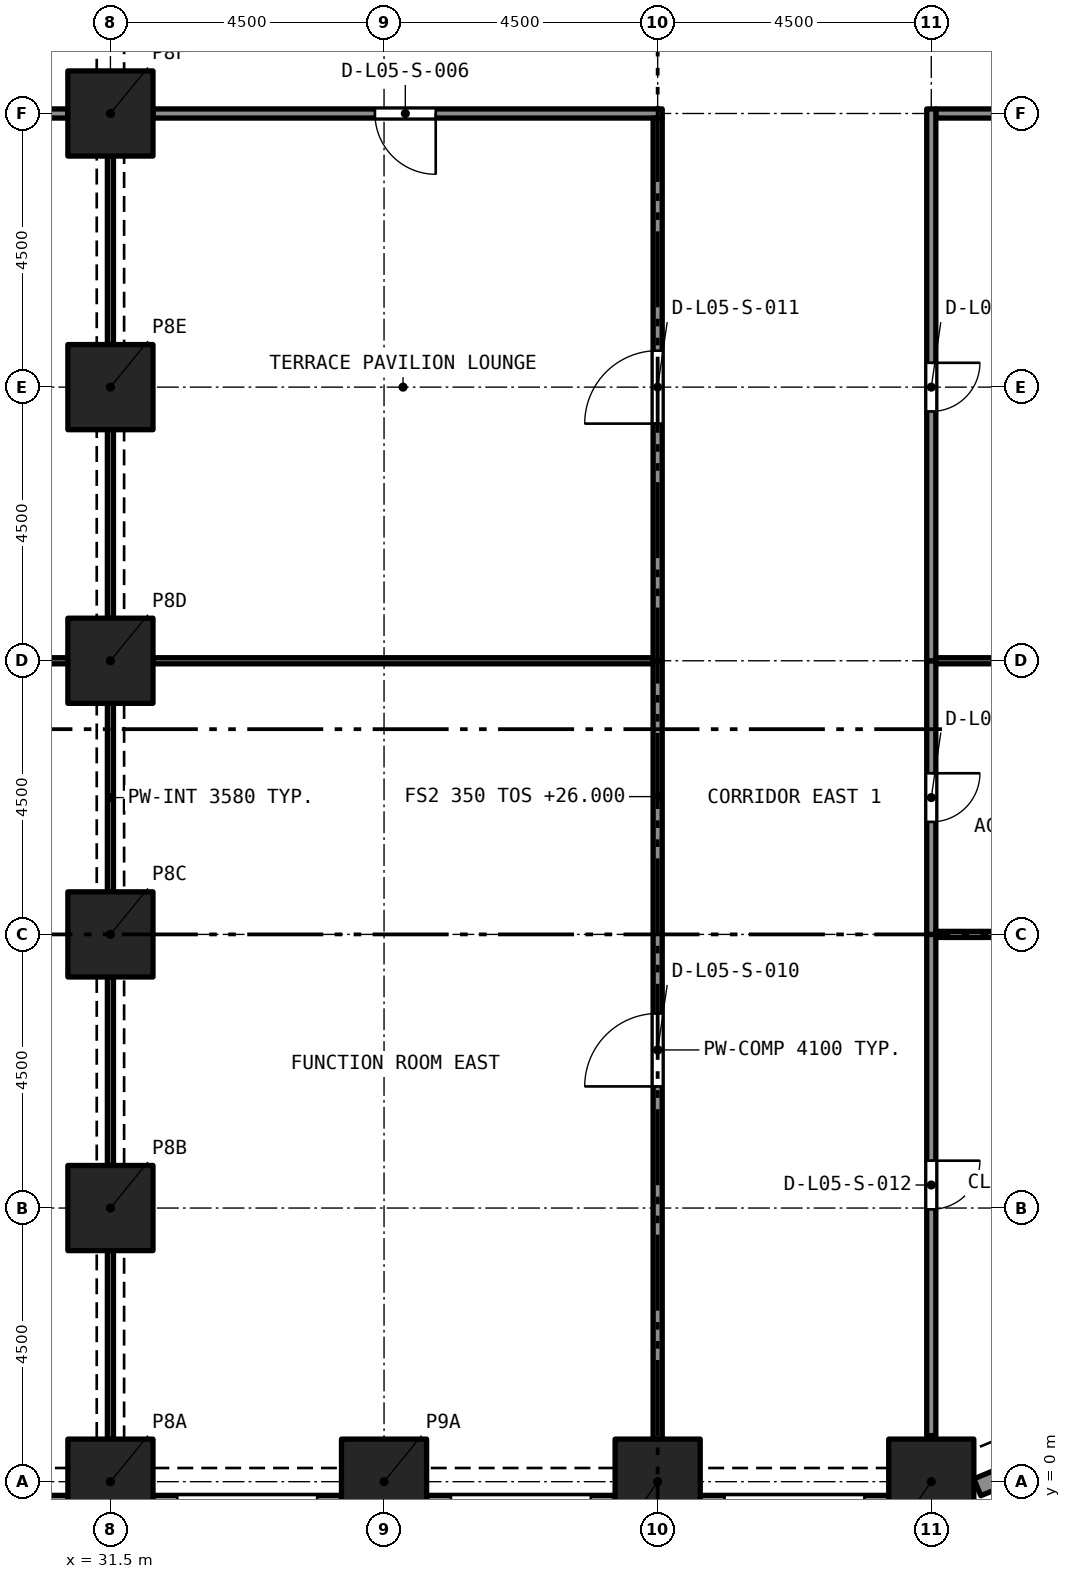
"""IFC4 building model, lengths in metres.
Left out: names, types, materials, properties, quantities, classifications, styles, units other than length and angle.
Written with IfcOpenShell. Run it as: python <this file> out.ifc"""

import sys

from ifc_helpers import new_model, si_unit, direction, frame, frame_2d, origin, origin_2d, place, context, subcontext, project, spatial, rectangle, extrude, element, fill, save


model = new_model("IFC4")
c1 = context("Model", 3, precision=1e-05, world=origin(), true_north=direction((0.0, 1.0)))
c2 = subcontext(c1, "Body", "Model", "MODEL_VIEW")
j1 = project(units=[si_unit("LENGTHUNIT", "METRE"), si_unit("PLANEANGLEUNIT", "RADIAN")], contexts=[c1])
p1 = place(None, origin())
s1 = spatial("IfcSite", under=j1, at=p1, CompositionType="ELEMENT")
p2 = place(p1, origin())
s2 = spatial("IfcBuilding", under=s1, at=p2, CompositionType="ELEMENT")
p3 = place(p2, frame((0.0, 0.0, 26.0)))
s3 = spatial("IfcBuildingStorey", under=s2, at=p3, CompositionType="ELEMENT", Elevation=26.0)
for number, where, z_axis, x_axis in (
    (1, (31.5, 0.0, 0.0), (0.0, 0.0, 1.0), (1.0, 0.0, 0.0)),
    (2, (36.0, 0.0, 0.0), (0.0, 0.0, 1.0), (1.0, 0.0, 0.0)),
    (3, (40.5, 0.0, 0.0), (0.0, 0.0, 1.0), (1.0, 0.0, 0.0)),
    (4, (45.0, 0.0, 0.0), (0.0, 0.0, 1.0), (1.0, 0.0, 0.0)),
    (5, (31.5, 4.5, 0.0), (0.0, 0.0, 1.0), (1.0, 0.0, 0.0)),
    (6, (31.5, 9.0, 0.0), (0.0, 0.0, 1.0), (1.0, 0.0, 0.0)),
    (7, (31.5, 13.5, 0.0), (0.0, 0.0, 1.0), (1.0, 0.0, 0.0)),
    (8, (31.5, 18.0, 0.0), (0.0, 0.0, 1.0), (1.0, 0.0, 0.0)),
    (9, (31.5, 22.5, 0.0), (0.0, 0.0, 1.0), (1.0, 0.0, 0.0)),
):
    element("IfcColumn", number, at=place(p3, frame(where, z_axis=z_axis, x_axis=x_axis)), inside=s3, PredefinedType="COLUMN", context=c2, shape_type="SweptSolid", body=[
        extrude(rectangle(XDim=1.4, YDim=1.4, at=origin_2d()), origin(), (0.0, 0.0, 1.0), 4.4),
    ])
p4 = place(p3, frame((30.8, -0.375, 0.0), z_axis=(0.0, 0.0, 1.0), x_axis=(-1.0, 0.0, 0.0)))
e10 = element("IfcWall", 10, at=p4, inside=s3, PredefinedType="SOLIDWALL", context=c2, shape_type="SweptSolid", body=[
    extrude(rectangle(XDim=3.1, YDim=0.3, at=frame_2d((1.55, 0.0))), origin(), (0.0, 0.0, 1.0), 4.4),
])
p5 = place(p4, frame((0.4, 0.0, 0.45)))
e11 = element("IfcOpeningElement", 11, at=p5, cuts=e10, PredefinedType="OPENING", context=c2, shape_type="SweptSolid", body=[
    extrude(rectangle(XDim=2.3, YDim=2.55, at=frame_2d((1.15, 1.275))), frame((0.0, 0.16, 0.0), z_axis=(0.0, -1.0, 0.0), x_axis=(1.0, 0.0, 0.0)), (0.0, 0.0, 1.0), 0.32),
])
p6 = place(p3, frame((35.3, -0.375, 0.0), z_axis=(0.0, 0.0, 1.0), x_axis=(-1.0, 0.0, 0.0)))
e12 = element("IfcWall", 12, at=p6, inside=s3, PredefinedType="SOLIDWALL", context=c2, shape_type="SweptSolid", body=[
    extrude(rectangle(XDim=3.1, YDim=0.3, at=frame_2d((1.55, 0.0))), origin(), (0.0, 0.0, 1.0), 4.4),
])
p7 = place(p6, frame((0.4, 0.0, 0.45)))
e13 = element("IfcOpeningElement", 13, at=p7, cuts=e12, PredefinedType="OPENING", context=c2, shape_type="SweptSolid", body=[
    extrude(rectangle(XDim=2.3, YDim=2.55, at=frame_2d((1.15, 1.275))), frame((0.0, 0.16, 0.0), z_axis=(0.0, -1.0, 0.0), x_axis=(1.0, 0.0, 0.0)), (0.0, 0.0, 1.0), 0.32),
])
p8 = place(p3, frame((39.8, -0.375, 0.0), z_axis=(0.0, 0.0, 1.0), x_axis=(-1.0, 0.0, 0.0)))
e14 = element("IfcWall", 14, at=p8, inside=s3, PredefinedType="SOLIDWALL", context=c2, shape_type="SweptSolid", body=[
    extrude(rectangle(XDim=3.1, YDim=0.3, at=frame_2d((1.55, 0.0))), origin(), (0.0, 0.0, 1.0), 4.4),
])
p9 = place(p8, frame((0.4, 0.0, 0.45)))
e15 = element("IfcOpeningElement", 15, at=p9, cuts=e14, PredefinedType="OPENING", context=c2, shape_type="SweptSolid", body=[
    extrude(rectangle(XDim=2.3, YDim=2.55, at=frame_2d((1.15, 1.275))), frame((0.0, 0.16, 0.0), z_axis=(0.0, -1.0, 0.0), x_axis=(1.0, 0.0, 0.0)), (0.0, 0.0, 1.0), 0.32),
])
p10 = place(p3, frame((44.3, -0.375, 0.0), z_axis=(0.0, 0.0, 1.0), x_axis=(-1.0, 0.0, 0.0)))
e16 = element("IfcWall", 16, at=p10, inside=s3, PredefinedType="SOLIDWALL", context=c2, shape_type="SweptSolid", body=[
    extrude(rectangle(XDim=3.1, YDim=0.3, at=frame_2d((1.55, 0.0))), origin(), (0.0, 0.0, 1.0), 4.4),
])
p11 = place(p10, frame((0.4, 0.0, 0.45)))
e17 = element("IfcOpeningElement", 17, at=p11, cuts=e16, PredefinedType="OPENING", context=c2, shape_type="SweptSolid", body=[
    extrude(rectangle(XDim=2.3, YDim=2.55, at=frame_2d((1.15, 1.275))), frame((0.0, 0.16, 0.0), z_axis=(0.0, -1.0, 0.0), x_axis=(1.0, 0.0, 0.0)), (0.0, 0.0, 1.0), 0.32),
])
p12 = place(p3, frame((47.48, 0.622, 0.0), z_axis=(0.0, 0.0, 1.0), x_axis=(-0.923903565336, -0.38262540684, 0.0)))
e18 = element("IfcWall", 18, at=p12, inside=s3, PredefinedType="SOLIDWALL", context=c2, shape_type="SweptSolid", body=[
    extrude(rectangle(XDim=1.865, YDim=0.3, at=frame_2d((0.933, 0.0))), origin(), (0.0, 0.0, 1.0), 4.4),
])
p13 = place(p12, frame((0.258, 0.0, 0.45)))
e19 = element("IfcOpeningElement", 19, at=p13, cuts=e18, PredefinedType="OPENING", context=c2, shape_type="SweptSolid", body=[
    extrude(rectangle(XDim=1.1, YDim=2.55, at=frame_2d((0.55, 1.275))), frame((0.0, 0.16, 0.0), z_axis=(0.0, -1.0, 0.0), x_axis=(1.0, 0.0, 0.0)), (0.0, 0.0, 1.0), 0.32),
])
p14 = place(p3, frame((30.8, 22.5, 0.0), z_axis=(0.0, 0.0, 1.0), x_axis=(-1.0, 0.0, 0.0)))
e20 = element("IfcWall", 20, at=p14, inside=s3, PredefinedType="PARTITIONING", context=c2, shape_type="SweptSolid", body=[
    extrude(rectangle(XDim=12.1, YDim=0.15, at=frame_2d((6.05, 0.0))), origin(), (0.0, 0.0, 1.0), 3.95),
])
p15 = place(p14, frame((5.55, 0.0, 0.0)))
e21 = element("IfcOpeningElement", 21, at=p15, cuts=e20, PredefinedType="OPENING", context=c2, shape_type="SweptSolid", body=[
    extrude(rectangle(XDim=1.0, YDim=2.1, at=frame_2d((0.5, 1.05))), frame((0.0, 0.085, 0.0), z_axis=(0.0, -1.0, 0.0), x_axis=(1.0, 0.0, 0.0)), (0.0, 0.0, 1.0), 0.17),
])
p16 = place(p3, frame((30.8, 13.5, 0.0), z_axis=(0.0, 0.0, 1.0), x_axis=(-1.0, 0.0, 0.0)))
e22 = element("IfcWall", 22, at=p16, inside=s3, PredefinedType="PARTITIONING", context=c2, shape_type="SweptSolid", body=[
    extrude(rectangle(XDim=12.1, YDim=0.1, at=frame_2d((6.05, 0.0))), origin(), (0.0, 0.0, 1.0), 3.95),
])
p17 = place(p16, frame((5.55, 0.0, 0.0)))
e23 = element("IfcOpeningElement", 23, at=p17, cuts=e22, PredefinedType="OPENING", context=c2, shape_type="SweptSolid", body=[
    extrude(rectangle(XDim=1.0, YDim=2.1, at=frame_2d((0.5, 1.05))), frame((0.0, 0.06, 0.0), z_axis=(0.0, -1.0, 0.0), x_axis=(1.0, 0.0, 0.0)), (0.0, 0.0, 1.0), 0.12),
])
for number, where, z_axis, x_axis in (
    (24, (31.5, 9.7, 0.0), (0.0, 0.0, 1.0), (0.0, 1.0, 0.0)),
    (25, (31.5, 5.2, 0.0), (0.0, 0.0, 1.0), (0.0, 1.0, 0.0)),
    (26, (31.5, 0.7, 0.0), (0.0, 0.0, 1.0), (0.0, 1.0, 0.0)),
    (27, (31.5, 18.7, 0.0), (0.0, 0.0, 1.0), (0.0, 1.0, 0.0)),
    (28, (31.5, 14.2, 0.0), (0.0, 0.0, 1.0), (0.0, 1.0, 0.0)),
):
    element("IfcWall", number, at=place(p3, frame(where, z_axis=z_axis, x_axis=x_axis)), inside=s3, PredefinedType="PARTITIONING", context=c2, shape_type="SweptSolid", body=[
        extrude(rectangle(XDim=3.1, YDim=0.1, at=frame_2d((1.55, 0.0))), origin(), (0.0, 0.0, 1.0), 3.58),
    ])
p18 = place(p3, frame((40.575, 22.5, 0.0), z_axis=(0.0, 0.0, 1.0), x_axis=(-1.0, 0.0, 0.0)))
e29 = element("IfcWall", 29, at=p18, inside=s3, PredefinedType="PARTITIONING", context=c2, shape_type="SweptSolid", body=[
    extrude(rectangle(XDim=8.375, YDim=0.15, at=frame_2d((4.188, 0.0))), origin(), (0.0, 0.0, 1.0), 4.1),
])
p19 = place(p18, frame((3.725, 0.0, 0.0)))
e30 = element("IfcOpeningElement", 30, at=p19, cuts=e29, PredefinedType="OPENING", context=c2, shape_type="SweptSolid", body=[
    extrude(rectangle(XDim=1.0, YDim=2.1, at=frame_2d((0.5, 1.05))), frame((0.0, 0.085, 0.0), z_axis=(0.0, -1.0, 0.0), x_axis=(1.0, 0.0, 0.0)), (0.0, 0.0, 1.0), 0.17),
])
p20 = place(p3, frame((45.075, 22.5, 0.0), z_axis=(0.0, 0.0, 1.0), x_axis=(1.0, 0.0, 0.0)))
e31 = element("IfcWall", 31, at=p20, inside=s3, PredefinedType="PARTITIONING", context=c2, shape_type="SweptSolid", body=[
    extrude(rectangle(XDim=3.725, YDim=0.15, at=frame_2d((1.863, 0.0))), origin(), (0.0, 0.0, 1.0), 4.1),
])
p21 = place(p3, frame((32.2, 13.5, 0.0), z_axis=(0.0, 0.0, 1.0), x_axis=(1.0, 0.0, 0.0)))
e32 = element("IfcWall", 32, at=p21, inside=s3, PredefinedType="PARTITIONING", context=c2, shape_type="SweptSolid", body=[
    extrude(rectangle(XDim=8.225, YDim=0.1, at=frame_2d((4.113, 0.0))), origin(), (0.0, 0.0, 1.0), 4.1),
])
p22 = place(p3, frame((40.5, 0.7, 0.0), z_axis=(0.0, 0.0, 1.0), x_axis=(0.0, 1.0, 0.0)))
e33 = element("IfcWall", 33, at=p22, inside=s3, PredefinedType="PARTITIONING", context=c2, shape_type="SweptSolid", body=[
    extrude(rectangle(XDim=12.8, YDim=0.15, at=frame_2d((6.4, 0.0))), origin(), (0.0, 0.0, 1.0), 4.1),
])
p23 = place(p22, frame((5.8, 0.0, 0.0)))
e34 = element("IfcOpeningElement", 34, at=p23, cuts=e33, PredefinedType="OPENING", context=c2, shape_type="SweptSolid", body=[
    extrude(rectangle(XDim=1.2, YDim=2.1, at=frame_2d((0.6, 1.05))), frame((0.0, 0.085, 0.0), z_axis=(0.0, -1.0, 0.0), x_axis=(1.0, 0.0, 0.0)), (0.0, 0.0, 1.0), 0.17),
])
p24 = place(p3, frame((40.5, 13.5, 0.0), z_axis=(0.0, 0.0, 1.0), x_axis=(0.0, 1.0, 0.0)))
e35 = element("IfcWall", 35, at=p24, inside=s3, PredefinedType="PARTITIONING", context=c2, shape_type="SweptSolid", body=[
    extrude(rectangle(XDim=8.925, YDim=0.15, at=frame_2d((4.462, 0.0))), origin(), (0.0, 0.0, 1.0), 4.1),
])
p25 = place(p24, frame((3.9, 0.0, 0.0)))
e36 = element("IfcOpeningElement", 36, at=p25, cuts=e35, PredefinedType="OPENING", context=c2, shape_type="SweptSolid", body=[
    extrude(rectangle(XDim=1.2, YDim=2.1, at=frame_2d((0.6, 1.05))), frame((0.0, 0.085, 0.0), z_axis=(0.0, -1.0, 0.0), x_axis=(1.0, 0.0, 0.0)), (0.0, 0.0, 1.0), 0.17),
])
p26 = place(p3, frame((45.0, 9.0, 0.0), z_axis=(0.0, 0.0, 1.0), x_axis=(0.0, -1.0, 0.0)))
e37 = element("IfcWall", 37, at=p26, inside=s3, PredefinedType="PARTITIONING", context=c2, shape_type="SweptSolid", body=[
    extrude(rectangle(XDim=8.242, YDim=0.15, at=frame_2d((4.121, 0.0))), origin(), (0.0, 0.0, 1.0), 4.1),
])
p27 = place(p26, frame((3.721, 0.0, 0.0)))
e38 = element("IfcOpeningElement", 38, at=p27, cuts=e37, PredefinedType="OPENING", context=c2, shape_type="SweptSolid", body=[
    extrude(rectangle(XDim=0.8, YDim=2.1, at=frame_2d((0.4, 1.05))), frame((0.0, 0.085, 0.0), z_axis=(0.0, -1.0, 0.0), x_axis=(1.0, 0.0, 0.0)), (0.0, 0.0, 1.0), 0.17),
])
p28 = place(p3, frame((45.0, 13.5, 0.0), z_axis=(0.0, 0.0, 1.0), x_axis=(0.0, -1.0, 0.0)))
e39 = element("IfcWall", 39, at=p28, inside=s3, PredefinedType="PARTITIONING", context=c2, shape_type="SweptSolid", body=[
    extrude(rectangle(XDim=4.5, YDim=0.15, at=frame_2d((2.25, 0.0))), origin(), (0.0, 0.0, 1.0), 4.1),
])
p29 = place(p28, frame((1.85, 0.0, 0.0)))
e40 = element("IfcOpeningElement", 40, at=p29, cuts=e39, PredefinedType="OPENING", context=c2, shape_type="SweptSolid", body=[
    extrude(rectangle(XDim=0.8, YDim=2.1, at=frame_2d((0.4, 1.05))), frame((0.0, 0.085, 0.0), z_axis=(0.0, -1.0, 0.0), x_axis=(1.0, 0.0, 0.0)), (0.0, 0.0, 1.0), 0.17),
])
p30 = place(p3, frame((45.0, 22.575, 0.0), z_axis=(0.0, 0.0, 1.0), x_axis=(0.0, -1.0, 0.0)))
e41 = element("IfcWall", 41, at=p30, inside=s3, PredefinedType="PARTITIONING", context=c2, shape_type="SweptSolid", body=[
    extrude(rectangle(XDim=9.075, YDim=0.15, at=frame_2d((4.538, 0.0))), origin(), (0.0, 0.0, 1.0), 4.1),
])
p31 = place(p30, frame((4.175, 0.0, 0.0)))
e42 = element("IfcOpeningElement", 42, at=p31, cuts=e41, PredefinedType="OPENING", context=c2, shape_type="SweptSolid", body=[
    extrude(rectangle(XDim=0.8, YDim=2.1, at=frame_2d((0.4, 1.05))), frame((0.0, 0.085, 0.0), z_axis=(0.0, -1.0, 0.0), x_axis=(1.0, 0.0, 0.0)), (0.0, 0.0, 1.0), 0.17),
])
for number, where, z_axis, x_axis in (
    (43, (45.075, 9.0, 0.0), (0.0, 0.0, 1.0), (1.0, 0.0, 0.0)),
    (44, (45.075, 13.5, 0.0), (0.0, 0.0, 1.0), (1.0, 0.0, 0.0)),
):
    element("IfcWall", number, at=place(p3, frame(where, z_axis=z_axis, x_axis=x_axis)), inside=s3, PredefinedType="PARTITIONING", context=c2, shape_type="SweptSolid", body=[
        extrude(rectangle(XDim=3.725, YDim=0.1, at=frame_2d((1.863, 0.0))), origin(), (0.0, 0.0, 1.0), 4.1),
    ])
p32 = place(p19, origin())
e45 = element("IfcDoor", 45, at=p32, inside=s3, OperationType="SINGLE_SWING_RIGHT", PredefinedType="DOOR", context=c2, shape_type="SweptSolid", body=[
    extrude(rectangle(XDim=1.0, YDim=2.1, at=frame_2d((0.5, 1.05))), frame((0.0, 0.025, 0.0), z_axis=(0.0, -1.0, 0.0), x_axis=(1.0, 0.0, 0.0)), (0.0, 0.0, 1.0), 0.05),
])
fill(e30, e45)
p33 = place(p23, origin())
e46 = element("IfcDoor", 46, at=p33, inside=s3, OperationType="SINGLE_SWING_RIGHT", PredefinedType="DOOR", context=c2, shape_type="SweptSolid", body=[
    extrude(rectangle(XDim=1.2, YDim=2.1, at=frame_2d((0.6, 1.05))), frame((0.0, 0.025, 0.0), z_axis=(0.0, -1.0, 0.0), x_axis=(1.0, 0.0, 0.0)), (0.0, 0.0, 1.0), 0.05),
])
fill(e34, e46)
p34 = place(p25, origin())
e47 = element("IfcDoor", 47, at=p34, inside=s3, OperationType="SINGLE_SWING_RIGHT", PredefinedType="DOOR", context=c2, shape_type="SweptSolid", body=[
    extrude(rectangle(XDim=1.2, YDim=2.1, at=frame_2d((0.6, 1.05))), frame((0.0, 0.025, 0.0), z_axis=(0.0, -1.0, 0.0), x_axis=(1.0, 0.0, 0.0)), (0.0, 0.0, 1.0), 0.05),
])
fill(e36, e47)
p35 = place(p27, origin())
e48 = element("IfcDoor", 48, at=p35, inside=s3, OperationType="SINGLE_SWING_RIGHT", PredefinedType="DOOR", context=c2, shape_type="SweptSolid", body=[
    extrude(rectangle(XDim=0.8, YDim=2.1, at=frame_2d((0.4, 1.05))), frame((0.0, 0.025, 0.0), z_axis=(0.0, -1.0, 0.0), x_axis=(1.0, 0.0, 0.0)), (0.0, 0.0, 1.0), 0.05),
])
fill(e38, e48)
p36 = place(p29, origin())
e49 = element("IfcDoor", 49, at=p36, inside=s3, OperationType="SINGLE_SWING_RIGHT", PredefinedType="DOOR", context=c2, shape_type="SweptSolid", body=[
    extrude(rectangle(XDim=0.8, YDim=2.1, at=frame_2d((0.4, 1.05))), frame((0.0, 0.025, 0.0), z_axis=(0.0, -1.0, 0.0), x_axis=(1.0, 0.0, 0.0)), (0.0, 0.0, 1.0), 0.05),
])
fill(e40, e49)
p37 = place(p31, origin())
e50 = element("IfcDoor", 50, at=p37, inside=s3, OperationType="SINGLE_SWING_RIGHT", PredefinedType="DOOR", context=c2, shape_type="SweptSolid", body=[
    extrude(rectangle(XDim=0.8, YDim=2.1, at=frame_2d((0.4, 1.05))), frame((0.0, 0.025, 0.0), z_axis=(0.0, -1.0, 0.0), x_axis=(1.0, 0.0, 0.0)), (0.0, 0.0, 1.0), 0.05),
])
fill(e42, e50)
save(model, sys.argv[1])
